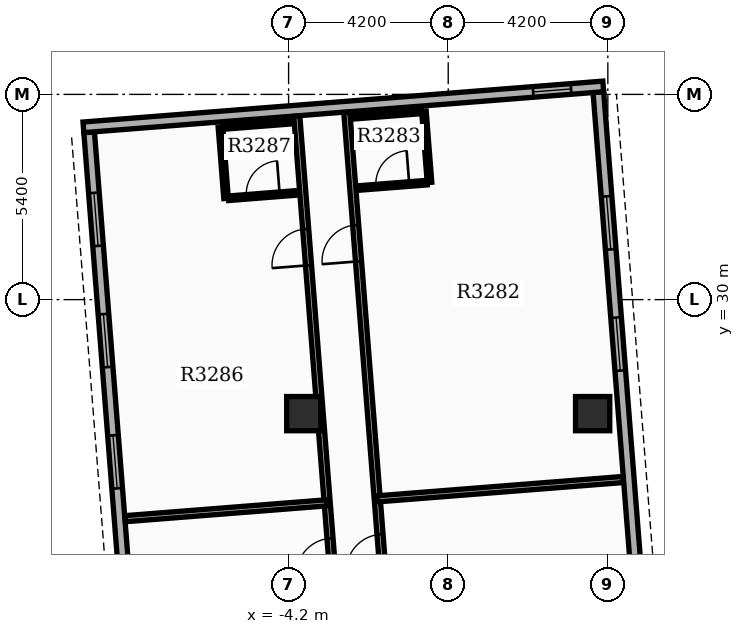
"""IFC4 building model, lengths in metres.
Left out: names, types, materials, properties, quantities, classifications, styles, units other than length and angle.
Written with IfcOpenShell. Run it as: python <this file> out.ifc"""

import sys

from ifc_helpers import new_model, si_unit, direction, frame, frame_2d, origin, origin_2d, place, context, subcontext, project, spatial, rectangle, extrude, element, fill, save


model = new_model("IFC4")
c1 = context("Model", 3, precision=1e-05, world=origin(), true_north=direction((0.0, 1.0)))
c2 = subcontext(c1, "Body", "Model", "MODEL_VIEW")
j1 = project(units=[si_unit("LENGTHUNIT", "METRE"), si_unit("PLANEANGLEUNIT", "RADIAN")], contexts=[c1])
p1 = place(None, origin())
s1 = spatial("IfcSite", under=j1, at=p1, CompositionType="ELEMENT")
p2 = place(p1, origin())
s2 = spatial("IfcBuilding", under=s1, at=p2, CompositionType="ELEMENT")
p3 = place(p2, frame((0.0, 0.0, 205.2)))
s3 = spatial("IfcBuildingStorey", under=s2, at=p3, CompositionType="ELEMENT", Elevation=205.2)
for number, where, z_axis, x_axis in (
    (1, (-3.8, 27.0, 0.0), (0.0, 0.0, 1.0), (1.0, 0.0, 0.0)),
    (2, (3.8, 27.0, 0.0), (0.0, 0.0, 1.0), (1.0, 0.0, 0.0)),
):
    element("IfcColumn", number, at=place(p3, frame(where, z_axis=z_axis, x_axis=x_axis)), inside=s3, PredefinedType="COLUMN", context=c2, shape_type="SweptSolid", body=[
        extrude(rectangle(XDim=0.9, YDim=0.9, at=origin_2d()), origin(), (0.0, 0.0, 1.0), 3.9),
    ])
p4 = place(p3, frame((5.527, 15.421, 0.0), z_axis=(0.0, 0.0, 1.0), x_axis=(-0.078452802979, 0.996917828963, 0.0)))
e3 = element("IfcWall", 3, at=p4, inside=s3, PredefinedType="STANDARD", context=c2, shape_type="SweptSolid", body=[
    extrude(rectangle(XDim=20.1, YDim=0.28, at=frame_2d((10.05, 0.0))), origin(), (0.0, 0.0, 1.0), 3.18),
])
p5 = place(p4, frame((1.6, 0.0, 0.8)))
e4 = element("IfcOpeningElement", 4, at=p5, cuts=e3, PredefinedType="OPENING", context=c2, shape_type="SweptSolid", body=[
    extrude(rectangle(XDim=1.4, YDim=1.6, at=frame_2d((0.7, 0.8))), frame((0.0, 0.15, 0.0), z_axis=(0.0, -1.0, 0.0), x_axis=(1.0, 0.0, 0.0)), (0.0, 0.0, 1.0), 0.3),
])
p6 = place(p4, frame((4.8, 0.0, 0.8)))
e5 = element("IfcOpeningElement", 5, at=p6, cuts=e3, PredefinedType="OPENING", context=c2, shape_type="SweptSolid", body=[
    extrude(rectangle(XDim=1.4, YDim=1.6, at=frame_2d((0.7, 0.8))), frame((0.0, 0.15, 0.0), z_axis=(0.0, -1.0, 0.0), x_axis=(1.0, 0.0, 0.0)), (0.0, 0.0, 1.0), 0.3),
])
p7 = place(p4, frame((12.75, 0.0, 0.8)))
e6 = element("IfcOpeningElement", 6, at=p7, cuts=e3, PredefinedType="OPENING", context=c2, shape_type="SweptSolid", body=[
    extrude(rectangle(XDim=1.4, YDim=1.6, at=frame_2d((0.7, 0.8))), frame((0.0, 0.15, 0.0), z_axis=(0.0, -1.0, 0.0), x_axis=(1.0, 0.0, 0.0)), (0.0, 0.0, 1.0), 0.3),
])
p8 = place(p4, frame((15.95, 0.0, 0.8)))
e7 = element("IfcOpeningElement", 7, at=p8, cuts=e3, PredefinedType="OPENING", context=c2, shape_type="SweptSolid", body=[
    extrude(rectangle(XDim=1.4, YDim=1.6, at=frame_2d((0.7, 0.8))), frame((0.0, 0.15, 0.0), z_axis=(0.0, -1.0, 0.0), x_axis=(1.0, 0.0, 0.0)), (0.0, 0.0, 1.0), 0.3),
])
p9 = place(p3, frame((-9.448, 34.405, 0.0), z_axis=(0.0, 0.0, 1.0), x_axis=(0.078452802979, -0.996917828963, 0.0)))
e8 = element("IfcWall", 8, at=p9, inside=s3, PredefinedType="STANDARD", context=c2, shape_type="SweptSolid", body=[
    extrude(rectangle(XDim=20.1, YDim=0.28, at=frame_2d((10.05, 0.0))), origin(), (0.0, 0.0, 1.0), 3.18),
])
p10 = place(p9, frame((1.6, 0.0, 0.8)))
e9 = element("IfcOpeningElement", 9, at=p10, cuts=e8, PredefinedType="OPENING", context=c2, shape_type="SweptSolid", body=[
    extrude(rectangle(XDim=1.4, YDim=1.6, at=frame_2d((0.7, 0.8))), frame((0.0, 0.15, 0.0), z_axis=(0.0, -1.0, 0.0), x_axis=(1.0, 0.0, 0.0)), (0.0, 0.0, 1.0), 0.3),
])
p11 = place(p9, frame((4.8, 0.0, 0.8)))
e10 = element("IfcOpeningElement", 10, at=p11, cuts=e8, PredefinedType="OPENING", context=c2, shape_type="SweptSolid", body=[
    extrude(rectangle(XDim=1.4, YDim=1.6, at=frame_2d((0.7, 0.8))), frame((0.0, 0.15, 0.0), z_axis=(0.0, -1.0, 0.0), x_axis=(1.0, 0.0, 0.0)), (0.0, 0.0, 1.0), 0.3),
])
p12 = place(p9, frame((8.0, 0.0, 0.8)))
e11 = element("IfcOpeningElement", 11, at=p12, cuts=e8, PredefinedType="OPENING", context=c2, shape_type="SweptSolid", body=[
    extrude(rectangle(XDim=1.4, YDim=1.6, at=frame_2d((0.7, 0.8))), frame((0.0, 0.15, 0.0), z_axis=(0.0, -1.0, 0.0), x_axis=(1.0, 0.0, 0.0)), (0.0, 0.0, 1.0), 0.3),
])
p13 = place(p9, frame((11.2, 0.0, 0.8)))
e12 = element("IfcOpeningElement", 12, at=p13, cuts=e8, PredefinedType="OPENING", context=c2, shape_type="SweptSolid", body=[
    extrude(rectangle(XDim=1.4, YDim=1.6, at=frame_2d((0.7, 0.8))), frame((0.0, 0.15, 0.0), z_axis=(0.0, -1.0, 0.0), x_axis=(1.0, 0.0, 0.0)), (0.0, 0.0, 1.0), 0.3),
])
p14 = place(p9, frame((15.0, 0.0, 0.0)))
e13 = element("IfcOpeningElement", 13, at=p14, cuts=e8, PredefinedType="OPENING", context=c2, shape_type="SweptSolid", body=[
    extrude(rectangle(XDim=0.96, YDim=2.1, at=frame_2d((0.48, 1.05))), frame((0.0, 0.15, 0.0), z_axis=(0.0, -1.0, 0.0), x_axis=(1.0, 0.0, 0.0)), (0.0, 0.0, 1.0), 0.3),
])
p15 = place(p3, frame((4.079, 35.61, 0.0), z_axis=(0.0, 0.0, 1.0), x_axis=(-0.996916198482, -0.078473519122, 0.0)))
e14 = element("IfcWall", 14, at=p15, inside=s3, PredefinedType="STANDARD", context=c2, shape_type="SweptSolid", body=[
    extrude(rectangle(XDim=13.72, YDim=0.28, at=frame_2d((6.86, 0.0))), origin(), (0.0, 0.0, 1.0), 3.18),
])
p16 = place(p15, frame((0.85, 0.0, 0.85)))
e15 = element("IfcOpeningElement", 15, at=p16, cuts=e14, PredefinedType="OPENING", context=c2, shape_type="SweptSolid", body=[
    extrude(rectangle(XDim=1.0, YDim=1.5, at=frame_2d((0.5, 0.75))), frame((0.0, 0.15, 0.0), z_axis=(0.0, -1.0, 0.0), x_axis=(1.0, 0.0, 0.0)), (0.0, 0.0, 1.0), 0.3),
])
p17 = place(p3, frame((-1.085, 14.811, 0.0), z_axis=(0.0, 0.0, 1.0), x_axis=(-0.0784484395, 0.996918172339, 0.0)))
e16 = element("IfcWall", 16, at=p17, inside=s3, PredefinedType="PARTITIONING", context=c2, shape_type="SweptSolid", body=[
    extrude(rectangle(XDim=20.182, YDim=0.16, at=frame_2d((10.091, 0.0))), origin(), (0.0, 0.0, 1.0), 3.17),
])
p18 = place(p17, frame((8.08, 0.0, 0.0)))
e17 = element("IfcOpeningElement", 17, at=p18, cuts=e16, PredefinedType="OPENING", context=c2, shape_type="SweptSolid", body=[
    extrude(rectangle(XDim=0.96, YDim=2.15, at=frame_2d((0.48, 1.075))), frame((0.0, 0.09, 0.0), z_axis=(0.0, -1.0, 0.0), x_axis=(1.0, 0.0, 0.0)), (0.0, 0.0, 1.0), 0.18),
])
p19 = place(p17, frame((16.247, 0.0, 0.0)))
e18 = element("IfcOpeningElement", 18, at=p19, cuts=e16, PredefinedType="OPENING", context=c2, shape_type="SweptSolid", body=[
    extrude(rectangle(XDim=0.96, YDim=2.15, at=frame_2d((0.48, 1.075))), frame((0.0, 0.09, 0.0), z_axis=(0.0, -1.0, 0.0), x_axis=(1.0, 0.0, 0.0)), (0.0, 0.0, 1.0), 0.18),
])
p20 = place(p3, frame((-1.868, 24.758, 0.0), z_axis=(0.0, 0.0, 1.0), x_axis=(0.996918226549, 0.078447750597, 0.0)))
e19 = element("IfcWall", 19, at=p20, inside=s3, PredefinedType="PARTITIONING", context=c2, shape_type="SweptSolid", body=[
    extrude(rectangle(XDim=6.492, YDim=0.16, at=frame_2d((3.246, 0.0))), origin(), (0.0, 0.0, 1.0), 3.17),
])
p21 = place(p3, frame((-2.371, 32.936, 0.0), z_axis=(0.0, 0.0, 1.0), x_axis=(0.996916400774, 0.0784709492, 0.0)))
e20 = element("IfcWall", 20, at=p21, inside=s3, PredefinedType="PARTITIONING", context=c2, shape_type="SweptSolid", body=[
    extrude(rectangle(XDim=1.82, YDim=0.12, at=frame_2d((0.91, 0.0))), origin(), (0.0, 0.0, 1.0), 3.17),
])
p22 = place(p21, frame((0.47, 0.0, 0.0)))
e21 = element("IfcOpeningElement", 21, at=p22, cuts=e20, PredefinedType="OPENING", context=c2, shape_type="SweptSolid", body=[
    extrude(rectangle(XDim=0.88, YDim=2.1, at=frame_2d((0.44, 1.05))), frame((0.0, 0.07, 0.0), z_axis=(0.0, -1.0, 0.0), x_axis=(1.0, 0.0, 0.0)), (0.0, 0.0, 1.0), 0.14),
])
p23 = place(p3, frame((-2.519, 34.81, 0.0), z_axis=(0.0, 0.0, 1.0), x_axis=(0.996926062126, 0.078348112001, 0.0)))
e22 = element("IfcWall", 22, at=p23, inside=s3, PredefinedType="PARTITIONING", context=c2, shape_type="SweptSolid", body=[
    extrude(rectangle(XDim=1.82, YDim=0.12, at=frame_2d((0.91, 0.0))), origin(), (0.0, 0.0, 1.0), 3.17),
])
p24 = place(p3, frame((-0.492, 33.083, 0.0), z_axis=(0.0, 0.0, 1.0), x_axis=(-0.078444342213, 0.99691849475, 0.0)))
e23 = element("IfcWall", 23, at=p24, inside=s3, PredefinedType="PARTITIONING", context=c2, shape_type="SweptSolid", body=[
    extrude(rectangle(XDim=1.88, YDim=0.12, at=frame_2d((0.94, 0.0))), origin(), (0.0, 0.0, 1.0), 3.17),
])
p25 = place(p3, frame((-2.401, 14.707, 0.0), z_axis=(0.0, 0.0, 1.0), x_axis=(-0.078460461943, 0.996917226209, 0.0)))
e24 = element("IfcWall", 24, at=p25, inside=s3, PredefinedType="PARTITIONING", context=c2, shape_type="SweptSolid", body=[
    extrude(rectangle(XDim=20.182, YDim=0.16, at=frame_2d((10.091, 0.0))), origin(), (0.0, 0.0, 1.0), 3.17),
])
p26 = place(p25, frame((8.08, 0.0, 0.0)))
e25 = element("IfcOpeningElement", 25, at=p26, cuts=e24, PredefinedType="OPENING", context=c2, shape_type="SweptSolid", body=[
    extrude(rectangle(XDim=0.96, YDim=2.15, at=frame_2d((0.48, 1.075))), frame((0.0, 0.09, 0.0), z_axis=(0.0, -1.0, 0.0), x_axis=(1.0, 0.0, 0.0)), (0.0, 0.0, 1.0), 0.18),
])
p27 = place(p25, frame((16.247, 0.0, 0.0)))
e26 = element("IfcOpeningElement", 26, at=p27, cuts=e24, PredefinedType="OPENING", context=c2, shape_type="SweptSolid", body=[
    extrude(rectangle(XDim=0.96, YDim=2.15, at=frame_2d((0.48, 1.075))), frame((0.0, 0.09, 0.0), z_axis=(0.0, -1.0, 0.0), x_axis=(1.0, 0.0, 0.0)), (0.0, 0.0, 1.0), 0.18),
])
p28 = place(p3, frame((-3.184, 24.654, 0.0), z_axis=(0.0, 0.0, 1.0), x_axis=(-0.996915801681, -0.078478559871, 0.0)))
e27 = element("IfcWall", 27, at=p28, inside=s3, PredefinedType="PARTITIONING", context=c2, shape_type="SweptSolid", body=[
    extrude(rectangle(XDim=5.332, YDim=0.16, at=frame_2d((2.666, 0.0))), origin(), (0.0, 0.0, 1.0), 3.17),
])
p29 = place(p3, frame((-5.781, 32.667, 0.0), z_axis=(0.0, 0.0, 1.0), x_axis=(0.996916400774, 0.0784709492, 0.0)))
e28 = element("IfcWall", 28, at=p29, inside=s3, PredefinedType="PARTITIONING", context=c2, shape_type="SweptSolid", body=[
    extrude(rectangle(XDim=1.82, YDim=0.12, at=frame_2d((0.91, 0.0))), origin(), (0.0, 0.0, 1.0), 3.17),
])
p30 = place(p29, frame((0.47, 0.0, 0.0)))
e29 = element("IfcOpeningElement", 29, at=p30, cuts=e28, PredefinedType="OPENING", context=c2, shape_type="SweptSolid", body=[
    extrude(rectangle(XDim=0.88, YDim=2.1, at=frame_2d((0.44, 1.05))), frame((0.0, 0.07, 0.0), z_axis=(0.0, -1.0, 0.0), x_axis=(1.0, 0.0, 0.0)), (0.0, 0.0, 1.0), 0.14),
])
p31 = place(p3, frame((-5.928, 34.541, 0.0), z_axis=(0.0, 0.0, 1.0), x_axis=(0.996916400774, 0.0784709492, 0.0)))
e30 = element("IfcWall", 30, at=p31, inside=s3, PredefinedType="PARTITIONING", context=c2, shape_type="SweptSolid", body=[
    extrude(rectangle(XDim=1.82, YDim=0.12, at=frame_2d((0.91, 0.0))), origin(), (0.0, 0.0, 1.0), 3.17),
])
p32 = place(p3, frame((-5.846, 32.662, 0.0), z_axis=(0.0, 0.0, 1.0), x_axis=(-0.078444342213, 0.99691849475, 0.0)))
e31 = element("IfcWall", 31, at=p32, inside=s3, PredefinedType="PARTITIONING", context=c2, shape_type="SweptSolid", body=[
    extrude(rectangle(XDim=1.88, YDim=0.12, at=frame_2d((0.94, 0.0))), origin(), (0.0, 0.0, 1.0), 3.17),
])
p33 = place(p7, origin())
e32 = element("IfcWindow", 32, at=p33, inside=s3, PartitioningType="SINGLE_PANEL", PredefinedType="WINDOW", context=c2, shape_type="SweptSolid", body=[
    extrude(rectangle(XDim=1.4, YDim=1.6, at=frame_2d((0.7, 0.8))), frame((0.0, 0.03, 0.0), z_axis=(0.0, -1.0, 0.0), x_axis=(1.0, 0.0, 0.0)), (0.0, 0.0, 1.0), 0.06),
])
fill(e6, e32)
p34 = place(p8, origin())
e33 = element("IfcWindow", 33, at=p34, inside=s3, PartitioningType="SINGLE_PANEL", PredefinedType="WINDOW", context=c2, shape_type="SweptSolid", body=[
    extrude(rectangle(XDim=1.4, YDim=1.6, at=frame_2d((0.7, 0.8))), frame((0.0, 0.03, 0.0), z_axis=(0.0, -1.0, 0.0), x_axis=(1.0, 0.0, 0.0)), (0.0, 0.0, 1.0), 0.06),
])
fill(e7, e33)
p35 = place(p10, origin())
e34 = element("IfcWindow", 34, at=p35, inside=s3, PartitioningType="SINGLE_PANEL", PredefinedType="WINDOW", context=c2, shape_type="SweptSolid", body=[
    extrude(rectangle(XDim=1.4, YDim=1.6, at=frame_2d((0.7, 0.8))), frame((0.0, 0.03, 0.0), z_axis=(0.0, -1.0, 0.0), x_axis=(1.0, 0.0, 0.0)), (0.0, 0.0, 1.0), 0.06),
])
fill(e9, e34)
p36 = place(p11, origin())
e35 = element("IfcWindow", 35, at=p36, inside=s3, PartitioningType="SINGLE_PANEL", PredefinedType="WINDOW", context=c2, shape_type="SweptSolid", body=[
    extrude(rectangle(XDim=1.4, YDim=1.6, at=frame_2d((0.7, 0.8))), frame((0.0, 0.03, 0.0), z_axis=(0.0, -1.0, 0.0), x_axis=(1.0, 0.0, 0.0)), (0.0, 0.0, 1.0), 0.06),
])
fill(e10, e35)
p37 = place(p12, origin())
e36 = element("IfcWindow", 36, at=p37, inside=s3, PartitioningType="SINGLE_PANEL", PredefinedType="WINDOW", context=c2, shape_type="SweptSolid", body=[
    extrude(rectangle(XDim=1.4, YDim=1.6, at=frame_2d((0.7, 0.8))), frame((0.0, 0.03, 0.0), z_axis=(0.0, -1.0, 0.0), x_axis=(1.0, 0.0, 0.0)), (0.0, 0.0, 1.0), 0.06),
])
fill(e11, e36)
p38 = place(p16, origin())
e37 = element("IfcWindow", 37, at=p38, inside=s3, PartitioningType="SINGLE_PANEL", PredefinedType="WINDOW", context=c2, shape_type="SweptSolid", body=[
    extrude(rectangle(XDim=1.0, YDim=1.5, at=frame_2d((0.5, 0.75))), frame((0.0, 0.03, 0.0), z_axis=(0.0, -1.0, 0.0), x_axis=(1.0, 0.0, 0.0)), (0.0, 0.0, 1.0), 0.06),
])
fill(e15, e37)
p39 = place(p18, origin())
e38 = element("IfcDoor", 38, at=p39, inside=s3, OperationType="SINGLE_SWING_LEFT", PredefinedType="DOOR", context=c2, shape_type="SweptSolid", body=[
    extrude(rectangle(XDim=0.96, YDim=2.15, at=frame_2d((0.48, 1.075))), frame((0.0, 0.025, 0.0), z_axis=(0.0, -1.0, 0.0), x_axis=(1.0, 0.0, 0.0)), (0.0, 0.0, 1.0), 0.05),
])
fill(e17, e38)
p40 = place(p19, origin())
e39 = element("IfcDoor", 39, at=p40, inside=s3, OperationType="SINGLE_SWING_LEFT", PredefinedType="DOOR", context=c2, shape_type="SweptSolid", body=[
    extrude(rectangle(XDim=0.96, YDim=2.15, at=frame_2d((0.48, 1.075))), frame((0.0, 0.025, 0.0), z_axis=(0.0, -1.0, 0.0), x_axis=(1.0, 0.0, 0.0)), (0.0, 0.0, 1.0), 0.05),
])
fill(e18, e39)
p41 = place(p22, origin())
e40 = element("IfcDoor", 40, at=p41, inside=s3, OperationType="SINGLE_SWING_RIGHT", PredefinedType="DOOR", context=c2, shape_type="SweptSolid", body=[
    extrude(rectangle(XDim=0.88, YDim=2.1, at=frame_2d((0.44, 1.05))), frame((0.0, 0.025, 0.0), z_axis=(0.0, -1.0, 0.0), x_axis=(1.0, 0.0, 0.0)), (0.0, 0.0, 1.0), 0.05),
])
fill(e21, e40)
p42 = place(p26, origin())
e41 = element("IfcDoor", 41, at=p42, inside=s3, OperationType="SINGLE_SWING_LEFT", PredefinedType="DOOR", context=c2, shape_type="SweptSolid", body=[
    extrude(rectangle(XDim=0.96, YDim=2.15, at=frame_2d((0.48, 1.075))), frame((0.0, 0.025, 0.0), z_axis=(0.0, -1.0, 0.0), x_axis=(1.0, 0.0, 0.0)), (0.0, 0.0, 1.0), 0.05),
])
fill(e25, e41)
p43 = place(p27, origin())
e42 = element("IfcDoor", 42, at=p43, inside=s3, OperationType="SINGLE_SWING_LEFT", PredefinedType="DOOR", context=c2, shape_type="SweptSolid", body=[
    extrude(rectangle(XDim=0.96, YDim=2.15, at=frame_2d((0.48, 1.075))), frame((0.0, 0.025, 0.0), z_axis=(0.0, -1.0, 0.0), x_axis=(1.0, 0.0, 0.0)), (0.0, 0.0, 1.0), 0.05),
])
fill(e26, e42)
p44 = place(p30, origin())
e43 = element("IfcDoor", 43, at=p44, inside=s3, OperationType="SINGLE_SWING_RIGHT", PredefinedType="DOOR", context=c2, shape_type="SweptSolid", body=[
    extrude(rectangle(XDim=0.88, YDim=2.1, at=frame_2d((0.44, 1.05))), frame((0.0, 0.025, 0.0), z_axis=(0.0, -1.0, 0.0), x_axis=(1.0, 0.0, 0.0)), (0.0, 0.0, 1.0), 0.05),
])
fill(e29, e43)
save(model, sys.argv[1])
